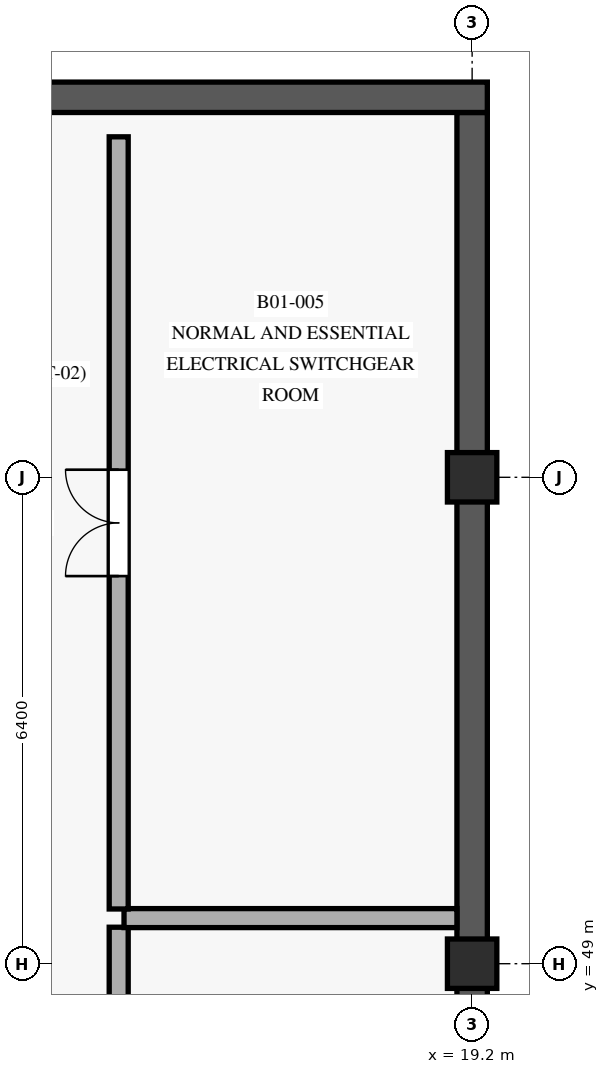
"""IFC4 building model, lengths in metres.
Left out: names, types, materials, properties, quantities, classifications, styles, units other than length and angle.
Written with IfcOpenShell. Run it as: python <this file> out.ifc"""

import sys

from ifc_helpers import new_model, si_unit, direction, frame, frame_2d, origin, origin_with_axes, origin_2d, place, context, subcontext, project, spatial, rectangle, extrude, element, fill, save


model = new_model("IFC4")
c1 = context("Model", 3, precision=1e-05, world=origin(), true_north=direction((0.0, 1.0)))
c2 = subcontext(c1, "Body", "Model", "MODEL_VIEW")
j1 = project(units=[si_unit("LENGTHUNIT", "METRE"), si_unit("PLANEANGLEUNIT", "RADIAN")], contexts=[c1])
p1 = place(None, origin())
s1 = spatial("IfcSite", under=j1, at=p1, CompositionType="ELEMENT")
p2 = place(p1, origin())
s2 = spatial("IfcBuilding", under=s1, at=p2, CompositionType="ELEMENT")
p3 = place(p2, frame((0.0, 0.0, -4.5)))
s3 = spatial("IfcBuildingStorey", under=s2, at=p3, CompositionType="ELEMENT", Elevation=-4.5)
for number, where, z_axis, x_axis in (
    (1, (19.2, 49.0, 0.0), (0.0, 0.0, 1.0), (1.0, 0.0, 0.0)),
    (2, (19.2, 55.4, 0.0), (0.0, 0.0, 1.0), (1.0, 0.0, 0.0)),
):
    element("IfcColumn", number, at=place(p3, frame(where, z_axis=z_axis, x_axis=x_axis)), inside=s3, PredefinedType="COLUMN", context=c2, shape_type="SweptSolid", body=[
        extrude(rectangle(XDim=0.65, YDim=0.65, at=origin_2d()), origin(), (0.0, 0.0, 1.0), 4.5),
    ])
p4 = place(p3, frame((19.2, 16.6, 0.0), z_axis=(0.0, 0.0, 1.0), x_axis=(0.0, 1.0, 0.0)))
e3 = element("IfcWall", 3, at=p4, inside=s3, PredefinedType="SHEAR", context=c2, shape_type="SweptSolid", body=[
    extrude(rectangle(XDim=43.6, YDim=0.4, at=frame_2d((21.8, 0.0))), origin(), (0.0, 0.0, 1.0), 4.15),
])
p5 = place(p3, frame((19.4, 60.4, 0.0), z_axis=(0.0, 0.0, 1.0), x_axis=(-1.0, 0.0, 0.0)))
e4 = element("IfcWall", 4, at=p5, inside=s3, PredefinedType="SHEAR", context=c2, shape_type="SweptSolid", body=[
    extrude(rectangle(XDim=15.0, YDim=0.4, at=frame_2d((7.5, 0.0))), origin(), (0.0, 0.0, 1.0), 4.15),
])
p6 = place(p3, frame((14.55, 39.32, 0.0), z_axis=(0.0, 0.0, 1.0), x_axis=(0.0, 1.0, 0.0)))
e5 = element("IfcWall", 5, at=p6, inside=s3, PredefinedType="SOLIDWALL", context=c2, shape_type="SweptSolid", body=[
    extrude(rectangle(XDim=10.16, YDim=0.25, at=frame_2d((5.08, 0.0))), origin(), (0.0, 0.0, 1.0), 3.595),
])
p7 = place(p6, frame((4.38, 0.0, 0.0)))
e6 = element("IfcOpeningElement", 6, at=p7, cuts=e5, PredefinedType="OPENING", context=c2, shape_type="SweptSolid", body=[
    extrude(rectangle(XDim=1.4, YDim=2.35, at=frame_2d((0.7, 1.175))), frame((0.0, 0.135, 0.0), z_axis=(0.0, -1.0, 0.0), x_axis=(1.0, 0.0, 0.0)), (0.0, 0.0, 1.0), 0.27),
])
p8 = place(p3, frame((14.62, 49.6, 0.0), z_axis=(0.0, 0.0, 1.0), x_axis=(1.0, 0.0, 0.0)))
e7 = element("IfcWall", 7, at=p8, inside=s3, PredefinedType="SOLIDWALL", context=c2, shape_type="SweptSolid", body=[
    extrude(rectangle(XDim=4.38, YDim=0.25, at=frame_2d((2.19, 0.0))), origin(), (0.0, 0.0, 1.0), 3.595),
])
p9 = place(p3, frame((14.55, 49.72, 0.0), z_axis=(0.0, 0.0, 1.0), x_axis=(0.0, 1.0, 0.0)))
e8 = element("IfcWall", 8, at=p9, inside=s3, PredefinedType="SOLIDWALL", context=c2, shape_type="SweptSolid", body=[
    extrude(rectangle(XDim=10.16, YDim=0.25, at=frame_2d((5.08, 0.0))), origin(), (0.0, 0.0, 1.0), 3.595),
])
p10 = place(p9, frame((4.38, 0.0, 0.0)))
e9 = element("IfcOpeningElement", 9, at=p10, cuts=e8, PredefinedType="OPENING", context=c2, shape_type="SweptSolid", body=[
    extrude(rectangle(XDim=1.4, YDim=2.35, at=frame_2d((0.7, 1.175))), frame((0.0, 0.135, 0.0), z_axis=(0.0, -1.0, 0.0), x_axis=(1.0, 0.0, 0.0)), (0.0, 0.0, 1.0), 0.27),
])
p11 = place(p10, origin_with_axes())
e10 = element("IfcDoor", 10, at=p11, inside=s3, OperationType="DOUBLE_DOOR_SINGLE_SWING", PredefinedType="DOOR", context=c2, shape_type="SweptSolid", body=[
    extrude(rectangle(XDim=1.4, YDim=2.35, at=frame_2d((0.7, 1.175))), frame((0.0, 0.025, 0.0), z_axis=(0.0, -1.0, 0.0), x_axis=(1.0, 0.0, 0.0)), (0.0, 0.0, 1.0), 0.05),
])
fill(e9, e10)
save(model, sys.argv[1])
